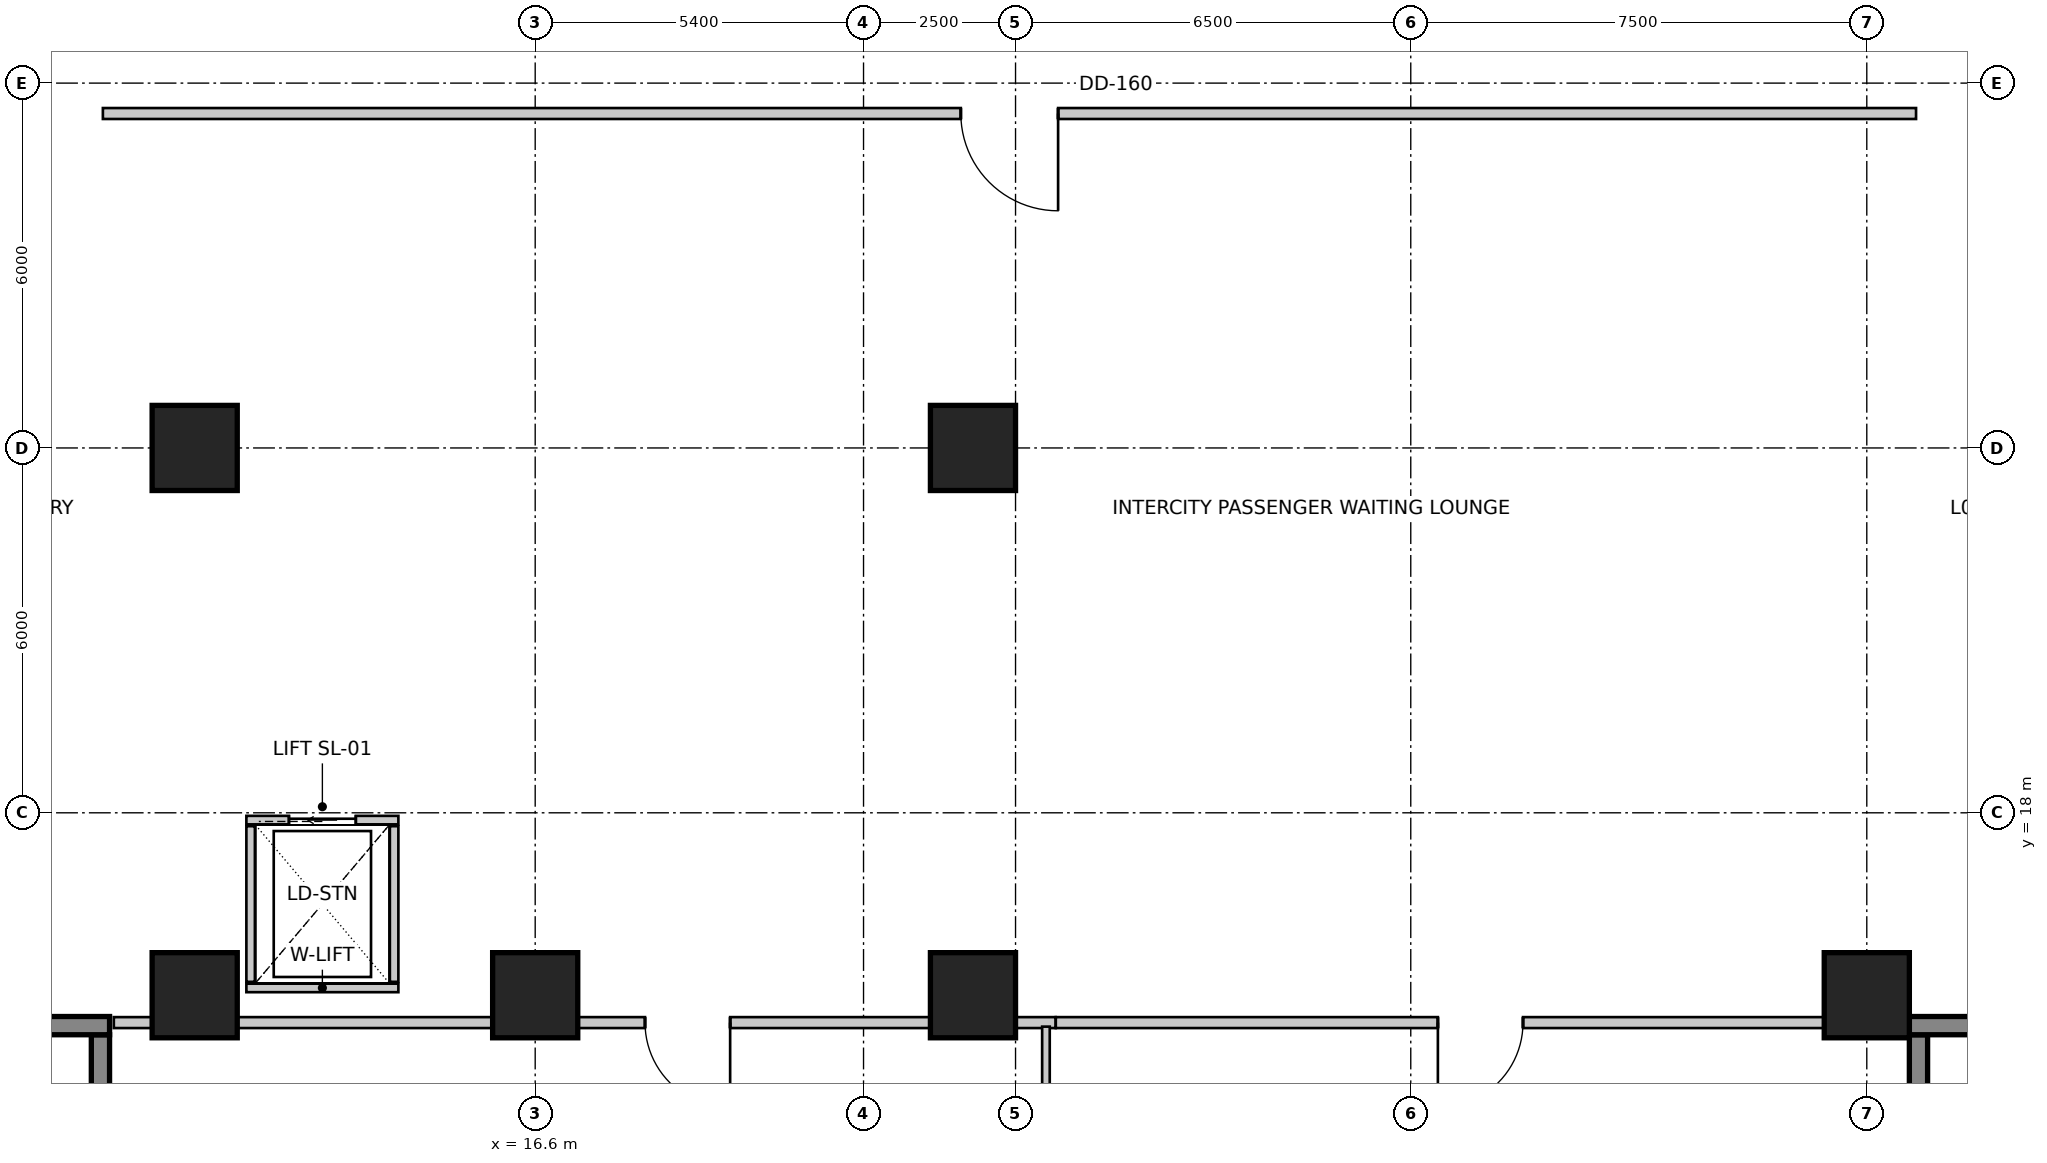
"""IFC4 building model, lengths in metres.
Left out: names, types, materials, properties, quantities, classifications, styles, units other than length and angle.
Written with IfcOpenShell. Run it as: python <this file> out.ifc"""

import sys

from ifc_helpers import new_model, si_unit, direction, frame, frame_2d, origin, origin_2d, place, context, subcontext, project, spatial, rectangle, extrude, source, transform, mapped, element, fill, save


model = new_model("IFC4")
c1 = context("Model", 3, precision=1e-05, world=origin(), true_north=direction((0.0, 1.0)))
c2 = subcontext(c1, "Body", "Model", "MODEL_VIEW")
j1 = project(units=[si_unit("LENGTHUNIT", "METRE"), si_unit("PLANEANGLEUNIT", "RADIAN")], contexts=[c1])
p1 = place(None, origin())
s1 = spatial("IfcSite", under=j1, at=p1, CompositionType="ELEMENT")
p2 = place(p1, origin())
s2 = spatial("IfcBuilding", under=s1, at=p2, CompositionType="ELEMENT")
p3 = place(p2, frame((0.0, 0.0, 6.0)))
s3 = spatial("IfcBuildingStorey", under=s2, at=p3, CompositionType="ELEMENT", Elevation=6.0)
p4 = place(p3, frame((9.45, 4.45, 0.0), z_axis=(0.0, 0.0, 1.0), x_axis=(0.0, 1.0, 0.0)))
e1 = element("IfcWall", 1, at=p4, inside=s3, PredefinedType="SHEAR", context=c2, shape_type="SweptSolid", body=[
    extrude(rectangle(XDim=9.9, YDim=0.3, at=frame_2d((4.95, 0.0))), origin(), (0.0, 0.0, 1.0), 5.2),
])
p5 = place(p3, frame((4.7, 14.5, 0.0), z_axis=(0.0, 0.0, 1.0), x_axis=(1.0, 0.0, 0.0)))
e2 = element("IfcWall", 2, at=p5, inside=s3, PredefinedType="SHEAR", context=c2, shape_type="SweptSolid", body=[
    extrude(rectangle(XDim=4.9, YDim=0.3, at=frame_2d((2.45, 0.0))), origin(), (0.0, 0.0, 1.0), 5.2),
])
m1 = source(origin(), c2, "Body", "SweptSolid", [
    extrude(rectangle(XDim=1.1, YDim=2.15, at=frame_2d((0.55, 1.075))), frame((0.0, 0.16, 0.0), z_axis=(0.0, -1.0, 0.0), x_axis=(1.0, 0.0, 0.0)), (0.0, 0.0, 1.0), 0.32),
])
p6 = place(p5, frame((1.9, 0.0, 0.0)))
e3 = element("IfcOpeningElement", 3, at=p6, cuts=e2, PredefinedType="OPENING", context=c2, shape_type="MappedRepresentation", body=[
    mapped(m1, transform((0.0, 0.0, 0.0), scale=1.0)),
])
p7 = place(p3, frame((39.35, 4.45, 0.0), z_axis=(0.0, 0.0, 1.0), x_axis=(0.0, 1.0, 0.0)))
e4 = element("IfcWall", 4, at=p7, inside=s3, PredefinedType="SHEAR", context=c2, shape_type="SweptSolid", body=[
    extrude(rectangle(XDim=9.9, YDim=0.3, at=frame_2d((4.95, 0.0))), origin(), (0.0, 0.0, 1.0), 5.2),
])
p8 = place(p3, frame((39.2, 14.5, 0.0), z_axis=(0.0, 0.0, 1.0), x_axis=(1.0, 0.0, 0.0)))
e5 = element("IfcWall", 5, at=p8, inside=s3, PredefinedType="SHEAR", context=c2, shape_type="SweptSolid", body=[
    extrude(rectangle(XDim=4.9, YDim=0.3, at=frame_2d((2.45, 0.0))), origin(), (0.0, 0.0, 1.0), 5.2),
])
p9 = place(p8, frame((1.9, 0.0, 0.0)))
e6 = element("IfcOpeningElement", 6, at=p9, cuts=e5, PredefinedType="OPENING", context=c2, shape_type="MappedRepresentation", body=[
    mapped(m1, transform((0.0, 0.0, 0.0), scale=1.0)),
])
m2 = source(origin(), c2, "Body", "SweptSolid", [
    extrude(rectangle(XDim=1.4, YDim=1.4, at=origin_2d()), origin(), (0.0, 0.0, 1.0), 5.2),
])
for number, where, z_axis, x_axis in (
    (7, (11.0, 15.0, 0.0), (0.0, 0.0, 1.0), (1.0, 0.0, 0.0)),
    (8, (16.6, 15.0, 0.0), (0.0, 0.0, 1.0), (1.0, 0.0, 0.0)),
    (9, (23.8, 15.0, 0.0), (0.0, 0.0, 1.0), (1.0, 0.0, 0.0)),
    (10, (38.5, 15.0, 0.0), (0.0, 0.0, 1.0), (1.0, 0.0, 0.0)),
    (11, (11.0, 24.0, 0.0), (0.0, 0.0, 1.0), (1.0, 0.0, 0.0)),
    (12, (23.8, 24.0, 0.0), (0.0, 0.0, 1.0), (1.0, 0.0, 0.0)),
):
    element("IfcColumn", number, at=place(p3, frame(where, z_axis=z_axis, x_axis=x_axis)), inside=s3, PredefinedType="COLUMN", context=c2, shape_type="MappedRepresentation", body=[
        mapped(m2, transform((0.0, 0.0, 0.0), scale=1.0)),
    ])
p10 = place(p3, frame((11.85, 17.88, 0.0), z_axis=(0.0, 0.0, 1.0), x_axis=(1.0, 0.0, 0.0)))
e13 = element("IfcWall", 13, at=p10, inside=s3, PredefinedType="SOLIDWALL", context=c2, shape_type="SweptSolid", body=[
    extrude(rectangle(XDim=2.5, YDim=0.14, at=frame_2d((1.25, 0.0))), origin(), (0.0, 0.0, 1.0), 4.9),
])
m3 = source(origin(), c2, "Body", "SweptSolid", [
    extrude(rectangle(XDim=1.1, YDim=2.15, at=frame_2d((0.55, 1.075))), frame((0.0, 0.08, 0.0), z_axis=(0.0, -1.0, 0.0), x_axis=(1.0, 0.0, 0.0)), (0.0, 0.0, 1.0), 0.16),
])
p11 = place(p10, frame((0.7, 0.0, 0.0)))
e14 = element("IfcOpeningElement", 14, at=p11, cuts=e13, PredefinedType="OPENING", context=c2, shape_type="MappedRepresentation", body=[
    mapped(m3, transform((0.0, 0.0, 0.0), scale=1.0)),
])
p12 = place(p3, frame((11.85, 15.12, 0.0), z_axis=(0.0, 0.0, 1.0), x_axis=(1.0, 0.0, 0.0)))
e15 = element("IfcWall", 15, at=p12, inside=s3, PredefinedType="SOLIDWALL", context=c2, shape_type="SweptSolid", body=[
    extrude(rectangle(XDim=2.5, YDim=0.14, at=frame_2d((1.25, 0.0))), origin(), (0.0, 0.0, 1.0), 3.692),
])
for number, where, z_axis, x_axis in (
    (16, (11.92, 15.22, 0.0), (0.0, 0.0, 1.0), (0.0, 1.0, 0.0)),
    (17, (14.28, 15.22, 0.0), (0.0, 0.0, 1.0), (0.0, 1.0, 0.0)),
):
    element("IfcWall", number, at=place(p3, frame(where, z_axis=z_axis, x_axis=x_axis)), inside=s3, PredefinedType="SOLIDWALL", context=c2, shape_type="SweptSolid", body=[
        extrude(rectangle(XDim=2.56, YDim=0.14, at=frame_2d((1.28, 0.0))), origin(), (0.0, 0.0, 1.0), 3.692),
    ])
p13 = place(p3, frame((39.31, 29.5, 0.0), z_axis=(0.0, 0.0, 1.0), x_axis=(-1.0, 0.0, 0.0)))
e18 = element("IfcWall", 18, at=p13, inside=s3, PredefinedType="PARTITIONING", context=c2, shape_type="SweptSolid", body=[
    extrude(rectangle(XDim=29.82, YDim=0.18, at=frame_2d((14.91, 0.0))), origin(), (0.0, 0.0, 1.0), 4.03),
])
m4 = source(origin(), c2, "Body", "SweptSolid", [
    extrude(rectangle(XDim=1.6, YDim=2.15, at=frame_2d((0.8, 1.075))), frame((0.0, 0.1, 0.0), z_axis=(0.0, -1.0, 0.0), x_axis=(1.0, 0.0, 0.0)), (0.0, 0.0, 1.0), 0.2),
])
p14 = place(p13, frame((14.11, 0.0, 0.0)))
e19 = element("IfcOpeningElement", 19, at=p14, cuts=e18, PredefinedType="OPENING", context=c2, shape_type="MappedRepresentation", body=[
    mapped(m4, transform((0.0, 0.0, 0.0), scale=1.0)),
])
p15 = place(p3, frame((25.16, 14.55, 0.0), z_axis=(0.0, 0.0, 1.0), x_axis=(-1.0, 0.0, 0.0)))
e20 = element("IfcWall", 20, at=p15, inside=s3, PredefinedType="PARTITIONING", context=c2, shape_type="SweptSolid", body=[
    extrude(rectangle(XDim=15.49, YDim=0.18, at=frame_2d((7.745, 0.0))), origin(), (0.0, 0.0, 1.0), 3.942),
])
m5 = source(origin(), c2, "Body", "SweptSolid", [
    extrude(rectangle(XDim=1.4, YDim=2.15, at=frame_2d((0.7, 1.075))), frame((0.0, 0.1, 0.0), z_axis=(0.0, -1.0, 0.0), x_axis=(1.0, 0.0, 0.0)), (0.0, 0.0, 1.0), 0.2),
])
p16 = place(p15, frame((5.354, 0.0, 0.0)))
e21 = element("IfcOpeningElement", 21, at=p16, cuts=e20, PredefinedType="OPENING", context=c2, shape_type="MappedRepresentation", body=[
    mapped(m5, transform((0.0, 0.0, 0.0), scale=1.0)),
])
p17 = place(p3, frame((39.13, 14.55, 0.0), z_axis=(0.0, 0.0, 1.0), x_axis=(-1.0, 0.0, 0.0)))
e22 = element("IfcWall", 22, at=p17, inside=s3, PredefinedType="PARTITIONING", context=c2, shape_type="SweptSolid", body=[
    extrude(rectangle(XDim=13.968, YDim=0.18, at=frame_2d((6.984, 0.0))), origin(), (0.0, 0.0, 1.0), 4.485),
])
p18 = place(p17, frame((6.284, 0.0, 0.0)))
e23 = element("IfcOpeningElement", 23, at=p18, cuts=e22, PredefinedType="OPENING", context=c2, shape_type="MappedRepresentation", body=[
    mapped(m5, transform((0.0, 0.0, 0.0), scale=1.0)),
])
p19 = place(p3, frame((25.0, 14.483, 0.0), z_axis=(0.0, 0.0, 1.0), x_axis=(0.0, -1.0, 0.0)))
e24 = element("IfcWall", 24, at=p19, inside=s3, PredefinedType="PARTITIONING", context=c2, shape_type="SweptSolid", body=[
    extrude(rectangle(XDim=12.219, YDim=0.125, at=frame_2d((6.109, 0.0))), origin(), (0.0, 0.0, 1.0), 3.692),
])
m6 = source(origin(), c2, "Body", "SweptSolid", [
    extrude(rectangle(XDim=1.1, YDim=2.15, at=frame_2d((0.55, 1.075))), frame((0.0, 0.025, 0.0), z_axis=(0.0, -1.0, 0.0), x_axis=(1.0, 0.0, 0.0)), (0.0, 0.0, 1.0), 0.05),
])
p20 = place(p11, origin())
e25 = element("IfcDoor", 25, at=p20, inside=s3, OperationType="SLIDING_TO_LEFT", PredefinedType="DOOR", context=c2, shape_type="MappedRepresentation", body=[
    mapped(m6, transform((0.0, 0.0, 0.0), scale=1.0)),
])
fill(e14, e25)
m7 = source(origin(), c2, "Body", "SweptSolid", [
    extrude(rectangle(XDim=1.6, YDim=2.15, at=frame_2d((0.8, 1.075))), frame((0.0, 0.025, 0.0), z_axis=(0.0, -1.0, 0.0), x_axis=(1.0, 0.0, 0.0)), (0.0, 0.0, 1.0), 0.05),
])
p21 = place(p14, origin())
e26 = element("IfcDoor", 26, at=p21, inside=s3, OperationType="SINGLE_SWING_LEFT", PredefinedType="DOOR", context=c2, shape_type="MappedRepresentation", body=[
    mapped(m7, transform((0.0, 0.0, 0.0), scale=1.0)),
])
fill(e19, e26)
m8 = source(origin(), c2, "Body", "SweptSolid", [
    extrude(rectangle(XDim=1.4, YDim=2.15, at=frame_2d((0.7, 1.075))), frame((0.0, 0.025, 0.0), z_axis=(0.0, -1.0, 0.0), x_axis=(1.0, 0.0, 0.0)), (0.0, 0.0, 1.0), 0.05),
])
p22 = place(p16, origin())
e27 = element("IfcDoor", 27, at=p22, inside=s3, OperationType="SINGLE_SWING_LEFT", PredefinedType="DOOR", context=c2, shape_type="MappedRepresentation", body=[
    mapped(m8, transform((0.0, 0.0, 0.0), scale=1.0)),
])
fill(e21, e27)
p23 = place(p18, origin())
e28 = element("IfcDoor", 28, at=p23, inside=s3, OperationType="SINGLE_SWING_RIGHT", PredefinedType="DOOR", context=c2, shape_type="MappedRepresentation", body=[
    mapped(m8, transform((0.0, 0.0, 0.0), scale=1.0)),
])
fill(e23, e28)
save(model, sys.argv[1])
